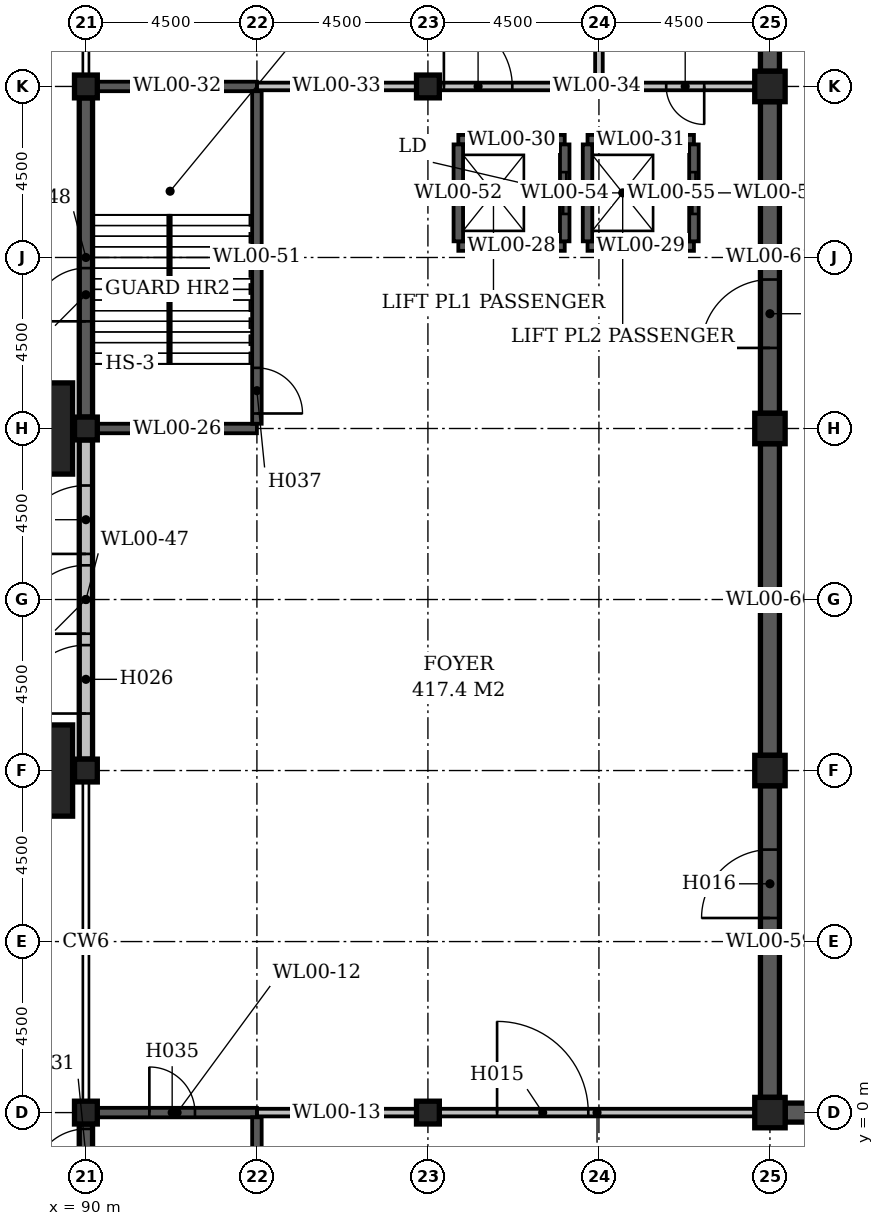
"""IFC4 building model, lengths in metres.
Left out: names, types, materials, properties, quantities, classifications, styles, units other than length and angle.
Written with IfcOpenShell. Run it as: python <this file> out.ifc"""

import sys

from ifc_helpers import new_model, si_unit, direction, frame, frame_2d, origin, origin_2d, place, context, subcontext, project, spatial, rectangle, extrude, element, fill, save


model = new_model("IFC4")
c1 = context("Model", 3, precision=1e-05, world=origin(), true_north=direction((0.0, 1.0)))
c2 = subcontext(c1, "Body", "Model", "MODEL_VIEW")
j1 = project(units=[si_unit("LENGTHUNIT", "METRE"), si_unit("PLANEANGLEUNIT", "RADIAN")], contexts=[c1])
p1 = place(None, origin())
s1 = spatial("IfcSite", under=j1, at=p1, CompositionType="ELEMENT")
p2 = place(p1, origin())
s2 = spatial("IfcBuilding", under=s1, at=p2, CompositionType="ELEMENT")
p3 = place(p2, origin())
s3 = spatial("IfcBuildingStorey", under=s2, at=p3, CompositionType="ELEMENT", Elevation=0.0)
for number, where, z_axis, x_axis in (
    (1, (90.0, 0.0, 0.0), (0.0, 0.0, 1.0), (1.0, 0.0, 0.0)),
    (2, (90.0, 9.0, 0.0), (0.0, 0.0, 1.0), (1.0, 0.0, 0.0)),
    (3, (90.0, 18.0, 0.0), (0.0, 0.0, 1.0), (1.0, 0.0, 0.0)),
    (4, (90.0, 27.0, 0.0), (0.0, 0.0, 1.0), (1.0, 0.0, 0.0)),
    (5, (99.0, 0.0, 0.0), (0.0, 0.0, 1.0), (1.0, 0.0, 0.0)),
    (6, (99.0, 27.0, 0.0), (0.0, 0.0, 1.0), (1.0, 0.0, 0.0)),
):
    element("IfcColumn", number, at=place(p3, frame(where, z_axis=z_axis, x_axis=x_axis)), inside=s3, PredefinedType="COLUMN", context=c2, shape_type="SweptSolid", body=[
        extrude(rectangle(XDim=0.6, YDim=0.6, at=origin_2d()), origin(), (0.0, 0.0, 1.0), 8.7),
    ])
for number, where, z_axis, x_axis in (
    (7, (108.0, 0.0, -0.3), (0.0, 0.0, 1.0), (1.0, 0.0, 0.0)),
    (8, (108.0, 9.0, -0.3), (0.0, 0.0, 1.0), (1.0, 0.0, 0.0)),
    (9, (108.0, 18.0, -0.3), (0.0, 0.0, 1.0), (1.0, 0.0, 0.0)),
    (10, (108.0, 27.0, -0.3), (0.0, 0.0, 1.0), (1.0, 0.0, 0.0)),
):
    element("IfcColumn", number, at=place(p3, frame(where, z_axis=z_axis, x_axis=x_axis)), inside=s3, PredefinedType="COLUMN", context=c2, shape_type="SweptSolid", body=[
        extrude(rectangle(XDim=0.8, YDim=0.8, at=origin_2d()), origin(), (0.0, 0.0, 1.0), 9.0),
    ])
p4 = place(p3, frame((90.3, 0.0, 0.0), z_axis=(0.0, 0.0, 1.0), x_axis=(1.0, 0.0, 0.0)))
e11 = element("IfcWall", 11, at=p4, inside=s3, PredefinedType="STANDARD", context=c2, shape_type="SweptSolid", body=[
    extrude(rectangle(XDim=4.2, YDim=0.25, at=frame_2d((2.1, 0.0))), origin(), (0.0, 0.0, 1.0), 9.0),
])
p5 = place(p4, frame((1.37, 0.0, 0.0)))
e12 = element("IfcOpeningElement", 12, at=p5, cuts=e11, PredefinedType="OPENING", context=c2, shape_type="SweptSolid", body=[
    extrude(rectangle(XDim=1.2, YDim=2.1, at=frame_2d((0.6, 1.05))), frame((0.0, 0.137, 0.0), z_axis=(0.0, -1.0, 0.0), x_axis=(1.0, 0.0, 0.0)), (0.0, 0.0, 1.0), 0.274),
])
p6 = place(p3, frame((94.5, 0.0, 0.0), z_axis=(0.0, 0.0, 1.0), x_axis=(1.0, 0.0, 0.0)))
e13 = element("IfcWall", 13, at=p6, inside=s3, PredefinedType="STANDARD", context=c2, shape_type="SweptSolid", body=[
    extrude(rectangle(XDim=4.2, YDim=0.2, at=frame_2d((2.1, 0.0))), origin(), (0.0, 0.0, 1.0), 8.7),
])
p7 = place(p3, frame((99.3, 0.0, 0.0), z_axis=(0.0, 0.0, 1.0), x_axis=(1.0, 0.0, 0.0)))
e14 = element("IfcWall", 14, at=p7, inside=s3, PredefinedType="STANDARD", context=c2, shape_type="SweptSolid", body=[
    extrude(rectangle(XDim=8.3, YDim=0.2, at=frame_2d((4.15, 0.0))), origin(), (0.0, 0.0, 1.0), 8.7),
])
p8 = place(p7, frame((1.52, 0.0, 0.0)))
e15 = element("IfcOpeningElement", 15, at=p8, cuts=e14, PredefinedType="OPENING", context=c2, shape_type="SweptSolid", body=[
    extrude(rectangle(XDim=2.4, YDim=2.7, at=frame_2d((1.2, 1.35))), frame((0.0, 0.112, 0.0), z_axis=(0.0, -1.0, 0.0), x_axis=(1.0, 0.0, 0.0)), (0.0, 0.0, 1.0), 0.224),
])
p9 = place(p3, frame((108.4, 0.0, 0.0), z_axis=(0.0, 0.0, 1.0), x_axis=(1.0, 0.0, 0.0)))
e16 = element("IfcWall", 16, at=p9, inside=s3, PredefinedType="STANDARD", context=c2, shape_type="SweptSolid", body=[
    extrude(rectangle(XDim=8.3, YDim=0.5, at=frame_2d((4.15, 0.0))), origin(), (0.0, 0.0, 1.0), 9.0),
])
p10 = place(p9, frame((4.72, 0.0, 0.0)))
e17 = element("IfcOpeningElement", 17, at=p10, cuts=e16, PredefinedType="OPENING", context=c2, shape_type="SweptSolid", body=[
    extrude(rectangle(XDim=1.8, YDim=2.4, at=frame_2d((0.9, 1.2))), frame((0.0, 0.262, 0.0), z_axis=(0.0, -1.0, 0.0), x_axis=(1.0, 0.0, 0.0)), (0.0, 0.0, 1.0), 0.524),
])
p11 = place(p3, frame((90.3, 18.0, 0.0), z_axis=(0.0, 0.0, 1.0), x_axis=(1.0, 0.0, 0.0)))
e18 = element("IfcWall", 18, at=p11, inside=s3, PredefinedType="STANDARD", context=c2, shape_type="SweptSolid", body=[
    extrude(rectangle(XDim=4.2, YDim=0.25, at=frame_2d((2.1, 0.0))), origin(), (0.0, 0.0, 1.0), 9.0),
])
for number, where, z_axis, x_axis in (
    (19, (99.8, 22.8, 0.0), (0.0, 0.0, 1.0), (1.0, 0.0, 0.0)),
    (20, (103.2, 22.8, 0.0), (0.0, 0.0, 1.0), (1.0, 0.0, 0.0)),
    (21, (99.8, 25.6, 0.0), (0.0, 0.0, 1.0), (1.0, 0.0, 0.0)),
    (22, (103.2, 25.6, 0.0), (0.0, 0.0, 1.0), (1.0, 0.0, 0.0)),
):
    element("IfcWall", number, at=place(p3, frame(where, z_axis=z_axis, x_axis=x_axis)), inside=s3, PredefinedType="STANDARD", context=c2, shape_type="SweptSolid", body=[
        extrude(rectangle(XDim=2.8, YDim=0.25, at=frame_2d((1.4, 0.0))), origin(), (0.0, 0.0, 1.0), 9.0),
    ])
p12 = place(p3, frame((90.3, 27.0, 0.0), z_axis=(0.0, 0.0, 1.0), x_axis=(1.0, 0.0, 0.0)))
e23 = element("IfcWall", 23, at=p12, inside=s3, PredefinedType="STANDARD", context=c2, shape_type="SweptSolid", body=[
    extrude(rectangle(XDim=4.2, YDim=0.25, at=frame_2d((2.1, 0.0))), origin(), (0.0, 0.0, 1.0), 9.0),
])
p13 = place(p3, frame((94.5, 27.0, 0.0), z_axis=(0.0, 0.0, 1.0), x_axis=(1.0, 0.0, 0.0)))
e24 = element("IfcWall", 24, at=p13, inside=s3, PredefinedType="STANDARD", context=c2, shape_type="SweptSolid", body=[
    extrude(rectangle(XDim=4.2, YDim=0.2, at=frame_2d((2.1, 0.0))), origin(), (0.0, 0.0, 1.0), 8.7),
])
p14 = place(p3, frame((99.3, 27.0, 0.0), z_axis=(0.0, 0.0, 1.0), x_axis=(1.0, 0.0, 0.0)))
e25 = element("IfcWall", 25, at=p14, inside=s3, PredefinedType="STANDARD", context=c2, shape_type="SweptSolid", body=[
    extrude(rectangle(XDim=8.3, YDim=0.2, at=frame_2d((4.15, 0.0))), origin(), (0.0, 0.0, 1.0), 8.7),
])
p15 = place(p14, frame((0.12, 0.0, 0.0)))
e26 = element("IfcOpeningElement", 26, at=p15, cuts=e25, PredefinedType="OPENING", context=c2, shape_type="SweptSolid", body=[
    extrude(rectangle(XDim=1.8, YDim=2.4, at=frame_2d((0.9, 1.2))), frame((0.0, 0.112, 0.0), z_axis=(0.0, -1.0, 0.0), x_axis=(1.0, 0.0, 0.0)), (0.0, 0.0, 1.0), 0.224),
])
p16 = place(p14, frame((5.97, 0.0, 0.0)))
e27 = element("IfcOpeningElement", 27, at=p16, cuts=e25, PredefinedType="OPENING", context=c2, shape_type="SweptSolid", body=[
    extrude(rectangle(XDim=1.0, YDim=2.1, at=frame_2d((0.5, 1.05))), frame((0.0, 0.112, 0.0), z_axis=(0.0, -1.0, 0.0), x_axis=(1.0, 0.0, 0.0)), (0.0, 0.0, 1.0), 0.224),
])
p17 = place(p3, frame((90.0, -8.65, 0.0), z_axis=(0.0, 0.0, 1.0), x_axis=(0.0, 1.0, 0.0)))
e28 = element("IfcWall", 28, at=p17, inside=s3, PredefinedType="STANDARD", context=c2, shape_type="SweptSolid", body=[
    extrude(rectangle(XDim=8.35, YDim=0.35, at=frame_2d((4.175, 0.0))), origin(), (0.0, 0.0, 1.0), 9.0),
])
p18 = place(p17, frame((6.82, 0.0, 0.0)))
e29 = element("IfcOpeningElement", 29, at=p18, cuts=e28, PredefinedType="OPENING", context=c2, shape_type="SweptSolid", body=[
    extrude(rectangle(XDim=1.4, YDim=2.1, at=frame_2d((0.7, 1.05))), frame((0.0, 0.187, 0.0), z_axis=(0.0, -1.0, 0.0), x_axis=(1.0, 0.0, 0.0)), (0.0, 0.0, 1.0), 0.374),
])
p19 = place(p3, frame((90.0, 9.3, 0.0), z_axis=(0.0, 0.0, 1.0), x_axis=(0.0, 1.0, 0.0)))
e30 = element("IfcWall", 30, at=p19, inside=s3, PredefinedType="STANDARD", context=c2, shape_type="SweptSolid", body=[
    extrude(rectangle(XDim=8.4, YDim=0.35, at=frame_2d((4.2, 0.0))), origin(), (0.0, 0.0, 1.0), 8.1),
])
p20 = place(p19, frame((1.2, 0.0, 0.0)))
e31 = element("IfcOpeningElement", 31, at=p20, cuts=e30, PredefinedType="OPENING", context=c2, shape_type="SweptSolid", body=[
    extrude(rectangle(XDim=1.8, YDim=2.4, at=frame_2d((0.9, 1.2))), frame((0.0, 0.187, 0.0), z_axis=(0.0, -1.0, 0.0), x_axis=(1.0, 0.0, 0.0)), (0.0, 0.0, 1.0), 0.374),
])
p21 = place(p19, frame((3.3, 0.0, 0.0)))
e32 = element("IfcOpeningElement", 32, at=p21, cuts=e30, PredefinedType="OPENING", context=c2, shape_type="SweptSolid", body=[
    extrude(rectangle(XDim=1.8, YDim=2.4, at=frame_2d((0.9, 1.2))), frame((0.0, 0.187, 0.0), z_axis=(0.0, -1.0, 0.0), x_axis=(1.0, 0.0, 0.0)), (0.0, 0.0, 1.0), 0.374),
])
p22 = place(p19, frame((5.4, 0.0, 0.0)))
e33 = element("IfcOpeningElement", 33, at=p22, cuts=e30, PredefinedType="OPENING", context=c2, shape_type="SweptSolid", body=[
    extrude(rectangle(XDim=1.8, YDim=2.4, at=frame_2d((0.9, 1.2))), frame((0.0, 0.187, 0.0), z_axis=(0.0, -1.0, 0.0), x_axis=(1.0, 0.0, 0.0)), (0.0, 0.0, 1.0), 0.374),
])
p23 = place(p3, frame((90.0, 18.3, 0.0), z_axis=(0.0, 0.0, 1.0), x_axis=(0.0, 1.0, 0.0)))
e34 = element("IfcWall", 34, at=p23, inside=s3, PredefinedType="STANDARD", context=c2, shape_type="SweptSolid", body=[
    extrude(rectangle(XDim=8.4, YDim=0.35, at=frame_2d((4.2, 0.0))), origin(), (0.0, 0.0, 1.0), 9.0),
])
p24 = place(p23, frame((2.52, 0.0, 0.0)))
e35 = element("IfcOpeningElement", 35, at=p24, cuts=e34, PredefinedType="OPENING", context=c2, shape_type="SweptSolid", body=[
    extrude(rectangle(XDim=1.4, YDim=2.1, at=frame_2d((0.7, 1.05))), frame((0.0, 0.187, 0.0), z_axis=(0.0, -1.0, 0.0), x_axis=(1.0, 0.0, 0.0)), (0.0, 0.0, 1.0), 0.374),
])
p25 = place(p3, frame((94.5, -8.825, 0.0), z_axis=(0.0, 0.0, 1.0), x_axis=(0.0, 1.0, 0.0)))
e36 = element("IfcWall", 36, at=p25, inside=s3, PredefinedType="STANDARD", context=c2, shape_type="SweptSolid", body=[
    extrude(rectangle(XDim=8.7, YDim=0.25, at=frame_2d((4.35, 0.0))), origin(), (0.0, 0.0, 1.0), 9.0),
])
p26 = place(p3, frame((94.5, 18.125, 0.0), z_axis=(0.0, 0.0, 1.0), x_axis=(0.0, 1.0, 0.0)))
e37 = element("IfcWall", 37, at=p26, inside=s3, PredefinedType="STANDARD", context=c2, shape_type="SweptSolid", body=[
    extrude(rectangle(XDim=8.75, YDim=0.25, at=frame_2d((4.375, 0.0))), origin(), (0.0, 0.0, 1.0), 9.0),
])
p27 = place(p26, frame((0.27, 0.0, 0.0)))
e38 = element("IfcOpeningElement", 38, at=p27, cuts=e37, PredefinedType="OPENING", context=c2, shape_type="SweptSolid", body=[
    extrude(rectangle(XDim=1.2, YDim=2.1, at=frame_2d((0.6, 1.05))), frame((0.0, 0.137, 0.0), z_axis=(0.0, -1.0, 0.0), x_axis=(1.0, 0.0, 0.0)), (0.0, 0.0, 1.0), 0.274),
])
p28 = place(p3, frame((99.8, 22.925, 0.0), z_axis=(0.0, 0.0, 1.0), x_axis=(0.0, 1.0, 0.0)))
e39 = element("IfcWall", 39, at=p28, inside=s3, PredefinedType="STANDARD", context=c2, shape_type="SweptSolid", body=[
    extrude(rectangle(XDim=2.55, YDim=0.25, at=frame_2d((1.275, 0.0))), origin(), (0.0, 0.0, 1.0), 9.0),
])
p29 = place(p3, frame((102.6, 22.925, 0.0), z_axis=(0.0, 0.0, 1.0), x_axis=(0.0, 1.0, 0.0)))
e40 = element("IfcWall", 40, at=p29, inside=s3, PredefinedType="STANDARD", context=c2, shape_type="SweptSolid", body=[
    extrude(rectangle(XDim=2.55, YDim=0.25, at=frame_2d((1.275, 0.0))), origin(), (0.0, 0.0, 1.0), 9.0),
])
p30 = place(p29, frame((0.72, 0.0, 0.0)))
e41 = element("IfcOpeningElement", 41, at=p30, cuts=e40, PredefinedType="OPENING", context=c2, shape_type="SweptSolid", body=[
    extrude(rectangle(XDim=1.1, YDim=2.1, at=frame_2d((0.55, 1.05))), frame((0.0, 0.137, 0.0), z_axis=(0.0, -1.0, 0.0), x_axis=(1.0, 0.0, 0.0)), (0.0, 0.0, 1.0), 0.274),
])
p31 = place(p3, frame((103.2, 22.925, 0.0), z_axis=(0.0, 0.0, 1.0), x_axis=(0.0, 1.0, 0.0)))
e42 = element("IfcWall", 42, at=p31, inside=s3, PredefinedType="STANDARD", context=c2, shape_type="SweptSolid", body=[
    extrude(rectangle(XDim=2.55, YDim=0.25, at=frame_2d((1.275, 0.0))), origin(), (0.0, 0.0, 1.0), 9.0),
])
p32 = place(p3, frame((103.5, 27.1, 0.0), z_axis=(0.0, 0.0, 1.0), x_axis=(0.0, 1.0, 0.0)))
e43 = element("IfcWall", 43, at=p32, inside=s3, PredefinedType="STANDARD", context=c2, shape_type="SweptSolid", body=[
    extrude(rectangle(XDim=17.9, YDim=0.2, at=frame_2d((8.95, 0.0))), origin(), (0.0, 0.0, 1.0), 8.7),
])
p33 = place(p3, frame((106.0, 22.925, 0.0), z_axis=(0.0, 0.0, 1.0), x_axis=(0.0, 1.0, 0.0)))
e44 = element("IfcWall", 44, at=p33, inside=s3, PredefinedType="STANDARD", context=c2, shape_type="SweptSolid", body=[
    extrude(rectangle(XDim=2.55, YDim=0.25, at=frame_2d((1.275, 0.0))), origin(), (0.0, 0.0, 1.0), 9.0),
])
p34 = place(p33, frame((0.72, 0.0, 0.0)))
e45 = element("IfcOpeningElement", 45, at=p34, cuts=e44, PredefinedType="OPENING", context=c2, shape_type="SweptSolid", body=[
    extrude(rectangle(XDim=1.1, YDim=2.1, at=frame_2d((0.55, 1.05))), frame((0.0, 0.137, 0.0), z_axis=(0.0, -1.0, 0.0), x_axis=(1.0, 0.0, 0.0)), (0.0, 0.0, 1.0), 0.274),
])
p35 = place(p3, frame((108.0, 0.4, 0.0), z_axis=(0.0, 0.0, 1.0), x_axis=(0.0, 1.0, 0.0)))
e46 = element("IfcWall", 46, at=p35, inside=s3, PredefinedType="STANDARD", context=c2, shape_type="SweptSolid", body=[
    extrude(rectangle(XDim=8.2, YDim=0.5, at=frame_2d((4.1, 0.0))), origin(), (0.0, 0.0, 1.0), 9.0),
])
p36 = place(p35, frame((4.72, 0.0, 0.0)))
e47 = element("IfcOpeningElement", 47, at=p36, cuts=e46, PredefinedType="OPENING", context=c2, shape_type="SweptSolid", body=[
    extrude(rectangle(XDim=1.8, YDim=2.4, at=frame_2d((0.9, 1.2))), frame((0.0, 0.262, 0.0), z_axis=(0.0, -1.0, 0.0), x_axis=(1.0, 0.0, 0.0)), (0.0, 0.0, 1.0), 0.524),
])
p37 = place(p3, frame((108.0, 9.4, 0.0), z_axis=(0.0, 0.0, 1.0), x_axis=(0.0, 1.0, 0.0)))
e48 = element("IfcWall", 48, at=p37, inside=s3, PredefinedType="STANDARD", context=c2, shape_type="SweptSolid", body=[
    extrude(rectangle(XDim=8.2, YDim=0.5, at=frame_2d((4.1, 0.0))), origin(), (0.0, 0.0, 1.0), 9.0),
])
p38 = place(p3, frame((108.0, 18.4, 0.0), z_axis=(0.0, 0.0, 1.0), x_axis=(0.0, 1.0, 0.0)))
e49 = element("IfcWall", 49, at=p38, inside=s3, PredefinedType="STANDARD", context=c2, shape_type="SweptSolid", body=[
    extrude(rectangle(XDim=8.2, YDim=0.5, at=frame_2d((4.1, 0.0))), origin(), (0.0, 0.0, 1.0), 9.0),
])
p39 = place(p38, frame((1.72, 0.0, 0.0)))
e50 = element("IfcOpeningElement", 50, at=p39, cuts=e49, PredefinedType="OPENING", context=c2, shape_type="SweptSolid", body=[
    extrude(rectangle(XDim=1.8, YDim=2.4, at=frame_2d((0.9, 1.2))), frame((0.0, 0.262, 0.0), z_axis=(0.0, -1.0, 0.0), x_axis=(1.0, 0.0, 0.0)), (0.0, 0.0, 1.0), 0.524),
])
p40 = place(p3, frame((108.0, 27.4, 0.0), z_axis=(0.0, 0.0, 1.0), x_axis=(0.0, 1.0, 0.0)))
e51 = element("IfcWall", 51, at=p40, inside=s3, PredefinedType="STANDARD", context=c2, shape_type="SweptSolid", body=[
    extrude(rectangle(XDim=8.3, YDim=0.5, at=frame_2d((4.15, 0.0))), origin(), (0.0, 0.0, 1.0), 9.0),
])
for number, where, z_axis, x_axis in (
    (52, (88.85, 9.0, 0.0), (0.0, 0.0, 1.0), (1.0, 0.0, 0.0)),
    (53, (88.85, 18.0, 0.0), (0.0, 0.0, 1.0), (1.0, 0.0, 0.0)),
):
    element("IfcColumn", number, at=place(p3, frame(where, z_axis=z_axis, x_axis=x_axis)), inside=s3, PredefinedType="COLUMN", context=c2, shape_type="SweptSolid", body=[
        extrude(rectangle(XDim=1.6, YDim=2.4, at=origin_2d()), origin(), (0.0, 0.0, 1.0), 9.0),
    ])
p41 = place(p8, origin())
e54 = element("IfcDoor", 54, at=p41, inside=s3, OperationType="DOUBLE_DOOR_SINGLE_SWING", PredefinedType="DOOR", context=c2, shape_type="SweptSolid", body=[
    extrude(rectangle(XDim=2.4, YDim=2.7, at=frame_2d((1.2, 1.35))), frame((0.0, 0.025, 0.0), z_axis=(0.0, -1.0, 0.0), x_axis=(1.0, 0.0, 0.0)), (0.0, 0.0, 1.0), 0.05),
])
fill(e15, e54)
p42 = place(p36, origin())
e55 = element("IfcDoor", 55, at=p42, inside=s3, OperationType="DOUBLE_DOOR_SINGLE_SWING", PredefinedType="DOOR", context=c2, shape_type="SweptSolid", body=[
    extrude(rectangle(XDim=1.8, YDim=2.4, at=frame_2d((0.9, 1.2))), frame((0.0, 0.025, 0.0), z_axis=(0.0, -1.0, 0.0), x_axis=(1.0, 0.0, 0.0)), (0.0, 0.0, 1.0), 0.05),
])
fill(e47, e55)
p43 = place(p39, origin())
e56 = element("IfcDoor", 56, at=p43, inside=s3, OperationType="DOUBLE_DOOR_SINGLE_SWING", PredefinedType="DOOR", context=c2, shape_type="SweptSolid", body=[
    extrude(rectangle(XDim=1.8, YDim=2.4, at=frame_2d((0.9, 1.2))), frame((0.0, 0.025, 0.0), z_axis=(0.0, -1.0, 0.0), x_axis=(1.0, 0.0, 0.0)), (0.0, 0.0, 1.0), 0.05),
])
fill(e50, e56)
p44 = place(p20, origin())
e57 = element("IfcDoor", 57, at=p44, inside=s3, OperationType="DOUBLE_DOOR_SINGLE_SWING", PredefinedType="DOOR", context=c2, shape_type="SweptSolid", body=[
    extrude(rectangle(XDim=1.8, YDim=2.4, at=frame_2d((0.9, 1.2))), frame((0.0, 0.025, 0.0), z_axis=(0.0, -1.0, 0.0), x_axis=(1.0, 0.0, 0.0)), (0.0, 0.0, 1.0), 0.05),
])
fill(e31, e57)
p45 = place(p21, origin())
e58 = element("IfcDoor", 58, at=p45, inside=s3, OperationType="DOUBLE_DOOR_SINGLE_SWING", PredefinedType="DOOR", context=c2, shape_type="SweptSolid", body=[
    extrude(rectangle(XDim=1.8, YDim=2.4, at=frame_2d((0.9, 1.2))), frame((0.0, 0.025, 0.0), z_axis=(0.0, -1.0, 0.0), x_axis=(1.0, 0.0, 0.0)), (0.0, 0.0, 1.0), 0.05),
])
fill(e32, e58)
p46 = place(p22, origin())
e59 = element("IfcDoor", 59, at=p46, inside=s3, OperationType="DOUBLE_DOOR_SINGLE_SWING", PredefinedType="DOOR", context=c2, shape_type="SweptSolid", body=[
    extrude(rectangle(XDim=1.8, YDim=2.4, at=frame_2d((0.9, 1.2))), frame((0.0, 0.025, 0.0), z_axis=(0.0, -1.0, 0.0), x_axis=(1.0, 0.0, 0.0)), (0.0, 0.0, 1.0), 0.05),
])
fill(e33, e59)
p47 = place(p18, origin())
e60 = element("IfcDoor", 60, at=p47, inside=s3, OperationType="DOUBLE_DOOR_SINGLE_SWING", PredefinedType="DOOR", context=c2, shape_type="SweptSolid", body=[
    extrude(rectangle(XDim=1.4, YDim=2.1, at=frame_2d((0.7, 1.05))), frame((0.0, 0.025, 0.0), z_axis=(0.0, -1.0, 0.0), x_axis=(1.0, 0.0, 0.0)), (0.0, 0.0, 1.0), 0.05),
])
fill(e29, e60)
p48 = place(p24, origin())
e61 = element("IfcDoor", 61, at=p48, inside=s3, OperationType="DOUBLE_DOOR_SINGLE_SWING", PredefinedType="DOOR", context=c2, shape_type="SweptSolid", body=[
    extrude(rectangle(XDim=1.4, YDim=2.1, at=frame_2d((0.7, 1.05))), frame((0.0, 0.025, 0.0), z_axis=(0.0, -1.0, 0.0), x_axis=(1.0, 0.0, 0.0)), (0.0, 0.0, 1.0), 0.05),
])
fill(e35, e61)
p49 = place(p5, origin())
e62 = element("IfcDoor", 62, at=p49, inside=s3, OperationType="SINGLE_SWING_LEFT", PredefinedType="DOOR", context=c2, shape_type="SweptSolid", body=[
    extrude(rectangle(XDim=1.2, YDim=2.1, at=frame_2d((0.6, 1.05))), frame((0.0, 0.025, 0.0), z_axis=(0.0, -1.0, 0.0), x_axis=(1.0, 0.0, 0.0)), (0.0, 0.0, 1.0), 0.05),
])
fill(e12, e62)
p50 = place(p27, frame((1.2, 0.0, 0.0), z_axis=(0.0, 0.0, 1.0), x_axis=(-1.0, 0.0, 0.0)))
e63 = element("IfcDoor", 63, at=p50, inside=s3, OperationType="SINGLE_SWING_RIGHT", PredefinedType="DOOR", context=c2, shape_type="SweptSolid", body=[
    extrude(rectangle(XDim=1.2, YDim=2.1, at=frame_2d((0.6, 1.05))), frame((0.0, 0.025, 0.0), z_axis=(0.0, -1.0, 0.0), x_axis=(1.0, 0.0, 0.0)), (0.0, 0.0, 1.0), 0.05),
])
fill(e38, e63)
p51 = place(p15, origin())
e64 = element("IfcDoor", 64, at=p51, inside=s3, OperationType="DOUBLE_DOOR_SINGLE_SWING", PredefinedType="DOOR", context=c2, shape_type="SweptSolid", body=[
    extrude(rectangle(XDim=1.8, YDim=2.4, at=frame_2d((0.9, 1.2))), frame((0.0, 0.025, 0.0), z_axis=(0.0, -1.0, 0.0), x_axis=(1.0, 0.0, 0.0)), (0.0, 0.0, 1.0), 0.05),
])
fill(e26, e64)
p52 = place(p16, origin())
e65 = element("IfcDoor", 65, at=p52, inside=s3, OperationType="SINGLE_SWING_RIGHT", PredefinedType="DOOR", context=c2, shape_type="SweptSolid", body=[
    extrude(rectangle(XDim=1.0, YDim=2.1, at=frame_2d((0.5, 1.05))), frame((0.0, 0.025, 0.0), z_axis=(0.0, -1.0, 0.0), x_axis=(1.0, 0.0, 0.0)), (0.0, 0.0, 1.0), 0.05),
])
fill(e27, e65)
p53 = place(p30, origin())
e66 = element("IfcDoor", 66, at=p53, inside=s3, OperationType="SLIDING_TO_LEFT", PredefinedType="DOOR", context=c2, shape_type="SweptSolid", body=[
    extrude(rectangle(XDim=1.1, YDim=2.1, at=frame_2d((0.55, 1.05))), frame((0.0, 0.025, 0.0), z_axis=(0.0, -1.0, 0.0), x_axis=(1.0, 0.0, 0.0)), (0.0, 0.0, 1.0), 0.05),
])
fill(e41, e66)
p54 = place(p34, origin())
e67 = element("IfcDoor", 67, at=p54, inside=s3, OperationType="SLIDING_TO_LEFT", PredefinedType="DOOR", context=c2, shape_type="SweptSolid", body=[
    extrude(rectangle(XDim=1.1, YDim=2.1, at=frame_2d((0.55, 1.05))), frame((0.0, 0.025, 0.0), z_axis=(0.0, -1.0, 0.0), x_axis=(1.0, 0.0, 0.0)), (0.0, 0.0, 1.0), 0.05),
])
fill(e45, e67)
save(model, sys.argv[1])
